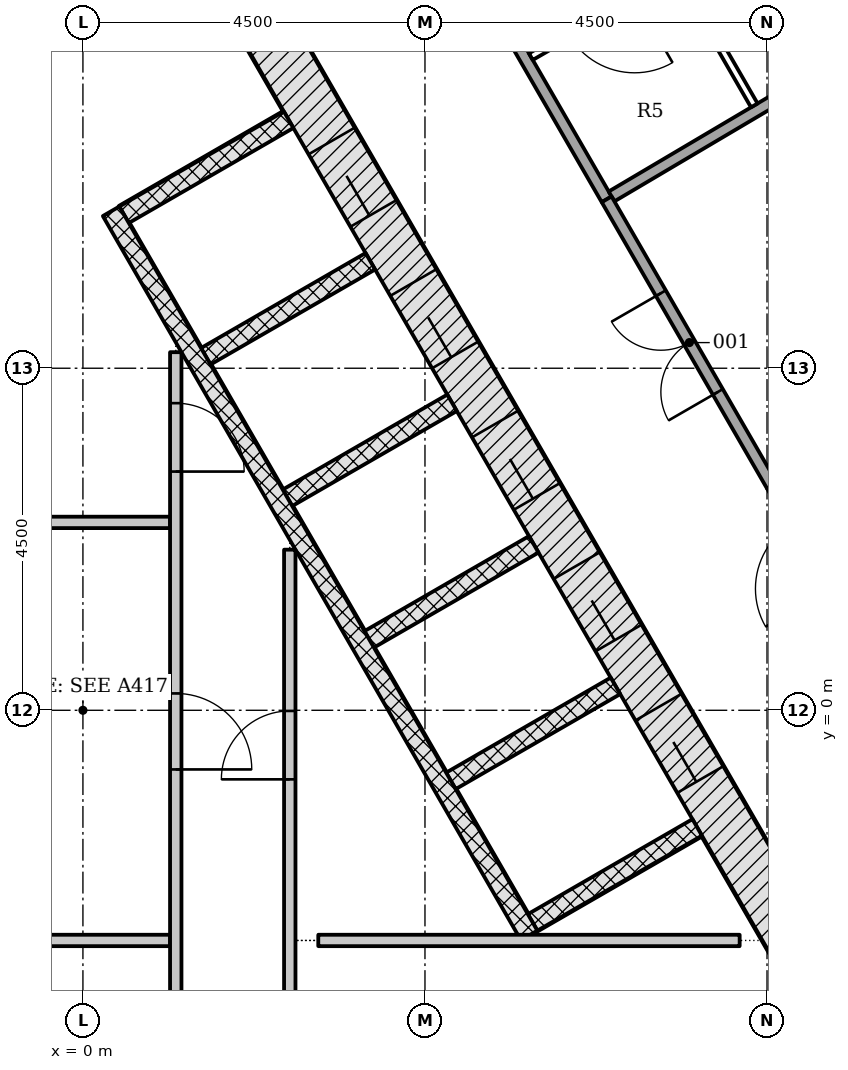
"""IFC4 building model, lengths in metres.
Left out: names, types, materials, properties, quantities, classifications, styles, units other than length and angle.
Written with IfcOpenShell. Run it as: python <this file> out.ifc"""

import sys

from ifc_helpers import new_model, si_unit, direction, frame, frame_2d, origin, place, context, subcontext, project, spatial, rectangle, extrude, element, fill, save


model = new_model("IFC4")
c1 = context("Model", 3, precision=1e-05, world=origin(), true_north=direction((0.0, 1.0)))
c2 = subcontext(c1, "Body", "Model", "MODEL_VIEW")
j1 = project(units=[si_unit("LENGTHUNIT", "METRE"), si_unit("PLANEANGLEUNIT", "RADIAN")], contexts=[c1])
p1 = place(None, origin())
s1 = spatial("IfcSite", under=j1, at=p1, CompositionType="ELEMENT")
p2 = place(p1, origin())
s2 = spatial("IfcBuilding", under=s1, at=p2, CompositionType="ELEMENT")
p3 = place(p2, frame((0.0, 0.0, 158.1)))
s3 = spatial("IfcBuildingStorey", under=s2, at=p3, CompositionType="ELEMENT", Elevation=158.1)
p4 = place(p3, frame((10.311, -4.703, -0.2), z_axis=(0.0, 0.0, 1.0), x_axis=(-0.500001446645, 0.866024568562, 0.0)))
e1 = element("IfcWall", 1, at=p4, inside=s3, PredefinedType="SHEAR", context=c2, shape_type="SweptSolid", body=[
    extrude(rectangle(XDim=18.458, YDim=0.7, at=frame_2d((9.229, 0.0))), origin(), (0.0, 0.0, 1.0), 3.6),
])
p5 = place(p4, frame((4.379, 0.0, 0.2)))
e2 = element("IfcOpeningElement", 2, at=p5, cuts=e1, PredefinedType="OPENING", context=c2, shape_type="SweptSolid", body=[
    extrude(rectangle(XDim=1.1, YDim=2.1, at=frame_2d((0.55, 1.05))), frame((0.0, 0.36, 0.0), z_axis=(0.0, -1.0, 0.0), x_axis=(1.0, 0.0, 0.0)), (0.0, 0.0, 1.0), 0.72),
])
p6 = place(p4, frame((6.529, 0.0, 0.2)))
e3 = element("IfcOpeningElement", 3, at=p6, cuts=e1, PredefinedType="OPENING", context=c2, shape_type="SweptSolid", body=[
    extrude(rectangle(XDim=1.1, YDim=2.1, at=frame_2d((0.55, 1.05))), frame((0.0, 0.36, 0.0), z_axis=(0.0, -1.0, 0.0), x_axis=(1.0, 0.0, 0.0)), (0.0, 0.0, 1.0), 0.72),
])
p7 = place(p4, frame((8.679, 0.0, 0.2)))
e4 = element("IfcOpeningElement", 4, at=p7, cuts=e1, PredefinedType="OPENING", context=c2, shape_type="SweptSolid", body=[
    extrude(rectangle(XDim=1.1, YDim=2.1, at=frame_2d((0.55, 1.05))), frame((0.0, 0.36, 0.0), z_axis=(0.0, -1.0, 0.0), x_axis=(1.0, 0.0, 0.0)), (0.0, 0.0, 1.0), 0.72),
])
p8 = place(p4, frame((10.829, 0.0, 0.2)))
e5 = element("IfcOpeningElement", 5, at=p8, cuts=e1, PredefinedType="OPENING", context=c2, shape_type="SweptSolid", body=[
    extrude(rectangle(XDim=1.1, YDim=2.1, at=frame_2d((0.55, 1.05))), frame((0.0, 0.36, 0.0), z_axis=(0.0, -1.0, 0.0), x_axis=(1.0, 0.0, 0.0)), (0.0, 0.0, 1.0), 0.72),
])
p9 = place(p4, frame((12.979, 0.0, 0.2)))
e6 = element("IfcOpeningElement", 6, at=p9, cuts=e1, PredefinedType="OPENING", context=c2, shape_type="SweptSolid", body=[
    extrude(rectangle(XDim=1.1, YDim=2.1, at=frame_2d((0.55, 1.05))), frame((0.0, 0.36, 0.0), z_axis=(0.0, -1.0, 0.0), x_axis=(1.0, 0.0, 0.0)), (0.0, 0.0, 1.0), 0.72),
])
for number, where, z_axis, x_axis in (
    (7, (8.081, -1.541, -0.2), (0.0, 0.0, 1.0), (-0.866, -0.5, 0.0)),
    (8, (7.006, 0.321, -0.2), (0.0, 0.0, 1.0), (-0.866, -0.5, 0.0)),
):
    element("IfcWall", number, at=place(p3, frame(where, z_axis=z_axis, x_axis=x_axis)), inside=s3, PredefinedType="PARTITIONING", context=c2, shape_type="SweptSolid", body=[
        extrude(rectangle(XDim=2.5, YDim=0.25, at=frame_2d((1.25, 0.0))), origin(), (0.0, 0.0, 1.0), 3.6),
    ])
p10 = place(p3, frame((5.931, 2.183, -0.2), z_axis=(0.0, 0.0, 1.0), x_axis=(-0.866047370643, -0.499961950354, 0.0)))
e9 = element("IfcWall", 9, at=p10, inside=s3, PredefinedType="PARTITIONING", context=c2, shape_type="SweptSolid", body=[
    extrude(rectangle(XDim=2.5, YDim=0.25, at=frame_2d((1.25, 0.0))), origin(), (0.0, 0.0, 1.0), 3.6),
])
for number, where, z_axis, x_axis in (
    (10, (4.856, 4.045, -0.2), (0.0, 0.0, 1.0), (-0.866, -0.5, 0.0)),
    (11, (3.781, 5.907, -0.2), (0.0, 0.0, 1.0), (-0.866, -0.5, 0.0)),
    (12, (2.706, 7.769, -0.2), (0.0, 0.0, 1.0), (-0.866, -0.5, 0.0)),
):
    element("IfcWall", number, at=place(p3, frame(where, z_axis=z_axis, x_axis=x_axis)), inside=s3, PredefinedType="PARTITIONING", context=c2, shape_type="SweptSolid", body=[
        extrude(rectangle(XDim=2.5, YDim=0.25, at=frame_2d((1.25, 0.0))), origin(), (0.0, 0.0, 1.0), 3.6),
    ])
p11 = place(p3, frame((5.87, -2.961, 0.0), z_axis=(0.0, 0.0, 1.0), x_axis=(-0.50000615651, 0.866021849293, 0.0)))
e13 = element("IfcWall", 13, at=p11, inside=s3, PredefinedType="PARTITIONING", context=c2, shape_type="SweptSolid", body=[
    extrude(rectangle(XDim=11.0, YDim=0.25, at=frame_2d((5.5, 0.0))), origin(), (0.0, 0.0, 1.0), 3.4),
])
p12 = place(p3, frame((-5.258, -3.028, 0.0), z_axis=(0.0, 0.0, 1.0), x_axis=(1.0, 0.0, 0.0)))
e14 = element("IfcWall", 14, at=p12, inside=s3, PredefinedType="PARTITIONING", context=c2, shape_type="SweptSolid", body=[
    extrude(rectangle(XDim=6.404, YDim=0.15, at=frame_2d((3.202, 0.0))), origin(), (0.0, 0.0, 1.0), 3.4),
])
p13 = place(p3, frame((-2.551, 2.472, 0.0), z_axis=(0.0, 0.0, 1.0), x_axis=(1.0, 0.0, 0.0)))
e15 = element("IfcWall", 15, at=p13, inside=s3, PredefinedType="PARTITIONING", context=c2, shape_type="SweptSolid", body=[
    extrude(rectangle(XDim=3.698, YDim=0.15, at=frame_2d((1.849, 0.0))), origin(), (0.0, 0.0, 1.0), 3.4),
])
p14 = place(p3, frame((1.221, 4.711, 0.0), z_axis=(0.0, 0.0, 1.0), x_axis=(0.0, -1.0, 0.0)))
e16 = element("IfcWall", 16, at=p14, inside=s3, PredefinedType="PARTITIONING", context=c2, shape_type="SweptSolid", body=[
    extrude(rectangle(XDim=10.939, YDim=0.15, at=frame_2d((5.47, 0.0))), origin(), (0.0, 0.0, 1.0), 3.4),
])
p15 = place(p14, frame((4.489, 0.0, 0.0)))
e17 = element("IfcOpeningElement", 17, at=p15, cuts=e16, PredefinedType="OPENING", context=c2, shape_type="SweptSolid", body=[
    extrude(rectangle(XDim=1.0, YDim=2.1, at=frame_2d((0.5, 1.05))), frame((0.0, 0.085, 0.0), z_axis=(0.0, -1.0, 0.0), x_axis=(1.0, 0.0, 0.0)), (0.0, 0.0, 1.0), 0.17),
])
p16 = place(p14, frame((0.671, 0.0, 0.0)))
e18 = element("IfcOpeningElement", 18, at=p16, cuts=e16, PredefinedType="OPENING", context=c2, shape_type="SweptSolid", body=[
    extrude(rectangle(XDim=0.9, YDim=2.1, at=frame_2d((0.45, 1.05))), frame((0.0, 0.085, 0.0), z_axis=(0.0, -1.0, 0.0), x_axis=(1.0, 0.0, 0.0)), (0.0, 0.0, 1.0), 0.17),
])
p17 = place(p3, frame((2.721, -5.928, 0.0), z_axis=(0.0, 0.0, 1.0), x_axis=(0.0, 1.0, 0.0)))
e19 = element("IfcWall", 19, at=p17, inside=s3, PredefinedType="PARTITIONING", context=c2, shape_type="SweptSolid", body=[
    extrude(rectangle(XDim=8.041, YDim=0.15, at=frame_2d((4.021, 0.0))), origin(), (0.0, 0.0, 1.0), 3.4),
])
p18 = place(p17, frame((5.02, 0.0, 0.0)))
e20 = element("IfcOpeningElement", 20, at=p18, cuts=e19, PredefinedType="OPENING", context=c2, shape_type="SweptSolid", body=[
    extrude(rectangle(XDim=0.9, YDim=2.1, at=frame_2d((0.45, 1.05))), frame((0.0, 0.085, 0.0), z_axis=(0.0, -1.0, 0.0), x_axis=(1.0, 0.0, 0.0)), (0.0, 0.0, 1.0), 0.17),
])
p19 = place(p3, frame((3.096, -3.028, 0.0), z_axis=(0.0, 0.0, 1.0), x_axis=(1.0, 0.0, 0.0)))
e21 = element("IfcWall", 21, at=p19, inside=s3, PredefinedType="PARTITIONING", context=c2, shape_type="SweptSolid", body=[
    extrude(rectangle(XDim=5.544, YDim=0.15, at=frame_2d((2.772, 0.0))), origin(), (0.0, 0.0, 1.0), 3.4),
])
p20 = place(p3, frame((15.782, -8.679, 0.0), z_axis=(0.0, 0.0, 1.0), x_axis=(-0.499998343211, 0.86602636033, 0.0)))
e22 = element("IfcWall", 22, at=p20, inside=s3, PredefinedType="PARTITIONING", context=c2, shape_type="SweptSolid", body=[
    extrude(rectangle(XDim=13.431, YDim=0.15, at=frame_2d((6.715, 0.0))), origin(), (0.0, 0.0, 1.0), 2.847),
])
p21 = place(p20, frame((6.396, 0.0, 0.0)))
e23 = element("IfcOpeningElement", 23, at=p21, cuts=e22, PredefinedType="OPENING", context=c2, shape_type="SweptSolid", body=[
    extrude(rectangle(XDim=1.0, YDim=2.1, at=frame_2d((0.5, 1.05))), frame((0.0, 0.085, 0.0), z_axis=(0.0, -1.0, 0.0), x_axis=(1.0, 0.0, 0.0)), (0.0, 0.0, 1.0), 0.17),
])
p22 = place(p20, frame((11.869, 0.0, 0.0)))
e24 = element("IfcOpeningElement", 24, at=p22, cuts=e22, PredefinedType="OPENING", context=c2, shape_type="SweptSolid", body=[
    extrude(rectangle(XDim=1.0, YDim=2.1, at=frame_2d((0.5, 1.05))), frame((0.0, 0.085, 0.0), z_axis=(0.0, -1.0, 0.0), x_axis=(1.0, 0.0, 0.0)), (0.0, 0.0, 1.0), 0.17),
])
p23 = place(p20, frame((9.691, 0.0, 0.0)))
e25 = element("IfcOpeningElement", 25, at=p23, cuts=e22, PredefinedType="OPENING", context=c2, shape_type="SweptSolid", body=[
    extrude(rectangle(XDim=1.0, YDim=2.1, at=frame_2d((0.5, 1.05))), frame((0.0, 0.085, 0.0), z_axis=(0.0, -1.0, 0.0), x_axis=(1.0, 0.0, 0.0)), (0.0, 0.0, 1.0), 0.17),
])
p24 = place(p3, frame((6.89, 6.722, 0.0), z_axis=(0.0, 0.0, 1.0), x_axis=(-0.500025224267, 0.866010840057, 0.0)))
e26 = element("IfcWall", 26, at=p24, inside=s3, PredefinedType="PARTITIONING", context=c2, shape_type="SweptSolid", body=[
    extrude(rectangle(XDim=5.351, YDim=0.15, at=frame_2d((2.676, 0.0))), origin(), (0.0, 0.0, 1.0), 2.847),
])
p25 = place(p3, frame((12.336, 9.943, 0.0), z_axis=(0.0, 0.0, 1.0), x_axis=(-0.860742216303, -0.509041095663, 0.0)))
e27 = element("IfcWall", 27, at=p25, inside=s3, PredefinedType="PARTITIONING", context=c2, shape_type="SweptSolid", body=[
    extrude(rectangle(XDim=6.252, YDim=0.15, at=frame_2d((3.126, 0.0))), origin(), (0.0, 0.0, 1.0), 3.4),
])
p26 = place(p25, frame((1.513, 0.0, 0.0)))
e28 = element("IfcOpeningElement", 28, at=p26, cuts=e27, PredefinedType="OPENING", context=c2, shape_type="SweptSolid", body=[
    extrude(rectangle(XDim=1.0, YDim=2.1, at=frame_2d((0.5, 1.05))), frame((0.0, 0.085, 0.0), z_axis=(0.0, -1.0, 0.0), x_axis=(1.0, 0.0, 0.0)), (0.0, 0.0, 1.0), 0.17),
])
p27 = place(p3, frame((9.067, 2.953, 0.0), z_axis=(0.0, 0.0, 1.0), x_axis=(-0.499987877897, 0.866032402371, 0.0)))
e29 = element("IfcWall", 29, at=p27, inside=s3, PredefinedType="PARTITIONING", context=c2, shape_type="SweptSolid", body=[
    extrude(rectangle(XDim=4.353, YDim=0.15, at=frame_2d((2.176, 0.0))), origin(), (0.0, 0.0, 1.0), 2.847),
])
p28 = place(p27, frame((1.426, 0.0, 0.0)))
e30 = element("IfcOpeningElement", 30, at=p28, cuts=e29, PredefinedType="OPENING", context=c2, shape_type="SweptSolid", body=[
    extrude(rectangle(XDim=1.5, YDim=2.1, at=frame_2d((0.75, 1.05))), frame((0.0, 0.085, 0.0), z_axis=(0.0, -1.0, 0.0), x_axis=(1.0, 0.0, 0.0)), (0.0, 0.0, 1.0), 0.17),
])
p29 = place(p3, frame((8.833, 7.958, 0.0), z_axis=(0.0, 0.0, 1.0), x_axis=(-0.499938124251, 0.866061124818, 0.0)))
e31 = element("IfcWall", 31, at=p29, inside=s3, PredefinedType="PARTITIONING", context=c2, shape_type="SweptSolid", body=[
    extrude(rectangle(XDim=2.025, YDim=0.1, at=frame_2d((1.013, 0.0))), origin(), (0.0, 0.0, 1.0), 3.4),
])
p30 = place(p3, frame((7.777, 9.687, 0.0), z_axis=(0.0, 0.0, 1.0), x_axis=(-0.866037911478, -0.499978335414, 0.0)))
e32 = element("IfcWall", 32, at=p30, inside=s3, PredefinedType="PARTITIONING", context=c2, shape_type="SweptSolid", body=[
    extrude(rectangle(XDim=2.175, YDim=0.1, at=frame_2d((1.087, 0.0))), origin(), (0.0, 0.0, 1.0), 3.4),
])
p31 = place(p30, frame((0.6, 0.0, 0.0)))
e33 = element("IfcOpeningElement", 33, at=p31, cuts=e32, PredefinedType="OPENING", context=c2, shape_type="SweptSolid", body=[
    extrude(rectangle(XDim=1.0, YDim=2.1, at=frame_2d((0.5, 1.05))), frame((0.0, 0.06, 0.0), z_axis=(0.0, -1.0, 0.0), x_axis=(1.0, 0.0, 0.0)), (0.0, 0.0, 1.0), 0.12),
])
p32 = place(p5, origin())
e34 = element("IfcDoor", 34, at=p32, inside=s3, OperationType="DOUBLE_DOOR_SLIDING", PredefinedType="DOOR", context=c2, shape_type="SweptSolid", body=[
    extrude(rectangle(XDim=1.1, YDim=2.1, at=frame_2d((0.55, 1.05))), frame((0.0, 0.025, 0.0), z_axis=(0.0, -1.0, 0.0), x_axis=(1.0, 0.0, 0.0)), (0.0, 0.0, 1.0), 0.05),
])
fill(e2, e34)
p33 = place(p6, origin())
e35 = element("IfcDoor", 35, at=p33, inside=s3, OperationType="DOUBLE_DOOR_SLIDING", PredefinedType="DOOR", context=c2, shape_type="SweptSolid", body=[
    extrude(rectangle(XDim=1.1, YDim=2.1, at=frame_2d((0.55, 1.05))), frame((0.0, 0.025, 0.0), z_axis=(0.0, -1.0, 0.0), x_axis=(1.0, 0.0, 0.0)), (0.0, 0.0, 1.0), 0.05),
])
fill(e3, e35)
p34 = place(p7, origin())
e36 = element("IfcDoor", 36, at=p34, inside=s3, OperationType="DOUBLE_DOOR_SLIDING", PredefinedType="DOOR", context=c2, shape_type="SweptSolid", body=[
    extrude(rectangle(XDim=1.1, YDim=2.1, at=frame_2d((0.55, 1.05))), frame((0.0, 0.025, 0.0), z_axis=(0.0, -1.0, 0.0), x_axis=(1.0, 0.0, 0.0)), (0.0, 0.0, 1.0), 0.05),
])
fill(e4, e36)
p35 = place(p8, origin())
e37 = element("IfcDoor", 37, at=p35, inside=s3, OperationType="DOUBLE_DOOR_SLIDING", PredefinedType="DOOR", context=c2, shape_type="SweptSolid", body=[
    extrude(rectangle(XDim=1.1, YDim=2.1, at=frame_2d((0.55, 1.05))), frame((0.0, 0.025, 0.0), z_axis=(0.0, -1.0, 0.0), x_axis=(1.0, 0.0, 0.0)), (0.0, 0.0, 1.0), 0.05),
])
fill(e5, e37)
p36 = place(p9, origin())
e38 = element("IfcDoor", 38, at=p36, inside=s3, OperationType="DOUBLE_DOOR_SLIDING", PredefinedType="DOOR", context=c2, shape_type="SweptSolid", body=[
    extrude(rectangle(XDim=1.1, YDim=2.1, at=frame_2d((0.55, 1.05))), frame((0.0, 0.025, 0.0), z_axis=(0.0, -1.0, 0.0), x_axis=(1.0, 0.0, 0.0)), (0.0, 0.0, 1.0), 0.05),
])
fill(e6, e38)
p37 = place(p15, origin())
e39 = element("IfcDoor", 39, at=p37, inside=s3, OperationType="SINGLE_SWING_RIGHT", PredefinedType="DOOR", context=c2, shape_type="SweptSolid", body=[
    extrude(rectangle(XDim=1.0, YDim=2.1, at=frame_2d((0.5, 1.05))), frame((0.0, 0.025, 0.0), z_axis=(0.0, -1.0, 0.0), x_axis=(1.0, 0.0, 0.0)), (0.0, 0.0, 1.0), 0.05),
])
fill(e17, e39)
p38 = place(p18, origin())
e40 = element("IfcDoor", 40, at=p38, inside=s3, OperationType="SINGLE_SWING_LEFT", PredefinedType="DOOR", context=c2, shape_type="SweptSolid", body=[
    extrude(rectangle(XDim=0.9, YDim=2.1, at=frame_2d((0.45, 1.05))), frame((0.0, 0.025, 0.0), z_axis=(0.0, -1.0, 0.0), x_axis=(1.0, 0.0, 0.0)), (0.0, 0.0, 1.0), 0.05),
])
fill(e20, e40)
p39 = place(p16, origin())
e41 = element("IfcDoor", 41, at=p39, inside=s3, OperationType="SINGLE_SWING_RIGHT", PredefinedType="DOOR", context=c2, shape_type="SweptSolid", body=[
    extrude(rectangle(XDim=0.9, YDim=2.1, at=frame_2d((0.45, 1.05))), frame((0.0, 0.025, 0.0), z_axis=(0.0, -1.0, 0.0), x_axis=(1.0, 0.0, 0.0)), (0.0, 0.0, 1.0), 0.05),
])
fill(e18, e41)
p40 = place(p28, origin())
e42 = element("IfcDoor", 42, at=p40, inside=s3, OperationType="DOUBLE_DOOR_SINGLE_SWING", PredefinedType="DOOR", context=c2, shape_type="SweptSolid", body=[
    extrude(rectangle(XDim=1.5, YDim=2.1, at=frame_2d((0.75, 1.05))), frame((0.0, 0.025, 0.0), z_axis=(0.0, -1.0, 0.0), x_axis=(1.0, 0.0, 0.0)), (0.0, 0.0, 1.0), 0.05),
])
fill(e30, e42)
save(model, sys.argv[1])
